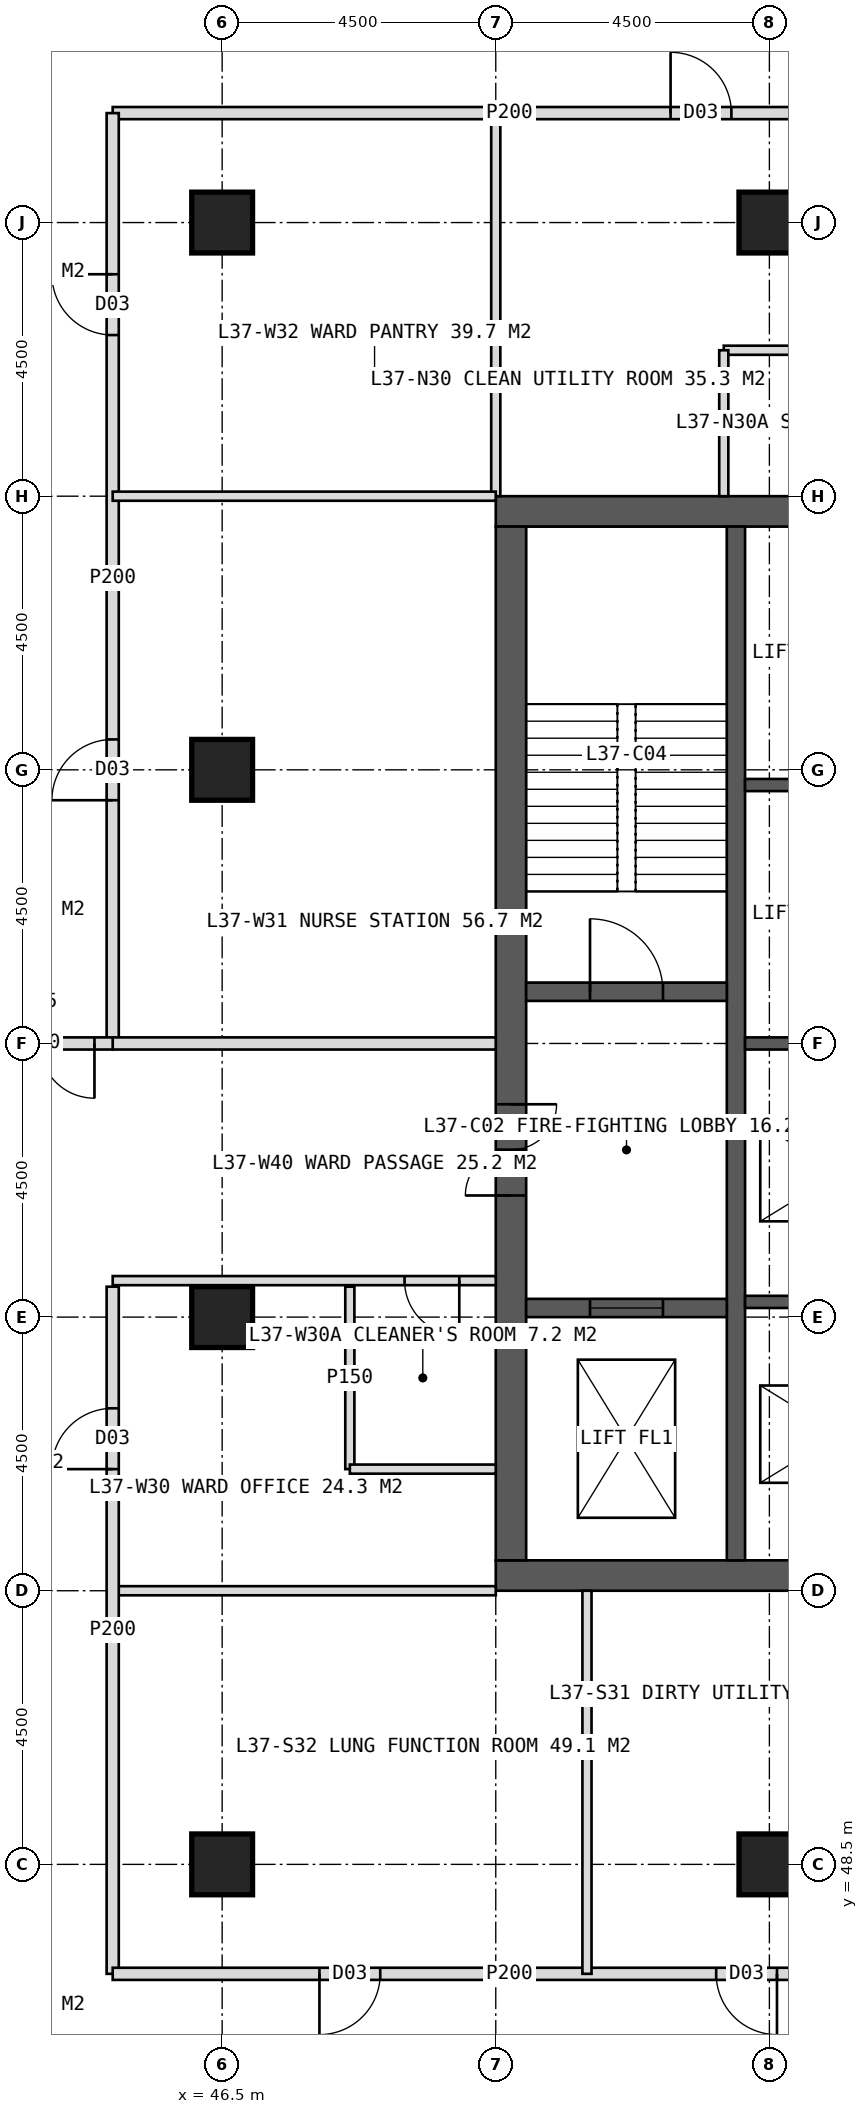
"""IFC4 building model, lengths in metres.
Left out: names, types, materials, properties, quantities, classifications, styles, units other than length and angle.
Written with IfcOpenShell. Run it as: python <this file> out.ifc"""

import sys

from ifc_helpers import new_model, si_unit, direction, frame, frame_2d, origin, origin_2d, place, context, subcontext, project, spatial, rectangle, hollow_rectangle, extrude, element, fill, save


model = new_model("IFC4")
c1 = context("Model", 3, precision=1e-05, world=origin(), true_north=direction((0.0, 1.0)))
c2 = subcontext(c1, "Body", "Model", "MODEL_VIEW")
j1 = project(units=[si_unit("LENGTHUNIT", "METRE"), si_unit("PLANEANGLEUNIT", "RADIAN")], contexts=[c1])
p1 = place(None, origin())
s1 = spatial("IfcSite", under=j1, at=p1, CompositionType="ELEMENT")
p2 = place(p1, origin())
s2 = spatial("IfcBuilding", under=s1, at=p2, CompositionType="ELEMENT")
p3 = place(p2, frame((0.0, 0.0, 156.0)))
s3 = spatial("IfcBuildingStorey", under=s2, at=p3, CompositionType="ELEMENT", Elevation=156.0)
p4 = place(p3, frame((51.0, 70.75, 0.0), z_axis=(0.0, 0.0, 1.0), x_axis=(1.0, 0.0, 0.0)))
e1 = element("IfcWall", 1, at=p4, inside=s3, PredefinedType="SHEAR", context=c2, shape_type="SweptSolid", body=[
    extrude(rectangle(XDim=18.0, YDim=0.5, at=frame_2d((9.0, 0.0))), origin(), (0.0, 0.0, 1.0), 4.0),
])
p5 = place(p4, frame((8.1, 0.0, 0.0)))
e2 = element("IfcOpeningElement", 2, at=p5, cuts=e1, PredefinedType="OPENING", context=c2, shape_type="SweptSolid", body=[
    extrude(rectangle(XDim=1.8, YDim=2.2, at=frame_2d((0.9, 1.1))), frame((0.0, 0.26, 0.0), z_axis=(0.0, -1.0, 0.0), x_axis=(1.0, 0.0, 0.0)), (0.0, 0.0, 1.0), 0.52),
])
p6 = place(p3, frame((51.0, 53.25, 0.0), z_axis=(0.0, 0.0, 1.0), x_axis=(1.0, 0.0, 0.0)))
e3 = element("IfcWall", 3, at=p6, inside=s3, PredefinedType="SHEAR", context=c2, shape_type="SweptSolid", body=[
    extrude(rectangle(XDim=18.0, YDim=0.5, at=frame_2d((9.0, 0.0))), origin(), (0.0, 0.0, 1.0), 4.0),
])
p7 = place(p6, frame((8.1, 0.0, 0.0)))
e4 = element("IfcOpeningElement", 4, at=p7, cuts=e3, PredefinedType="OPENING", context=c2, shape_type="SweptSolid", body=[
    extrude(rectangle(XDim=1.8, YDim=2.2, at=frame_2d((0.9, 1.1))), frame((0.0, 0.26, 0.0), z_axis=(0.0, -1.0, 0.0), x_axis=(1.0, 0.0, 0.0)), (0.0, 0.0, 1.0), 0.52),
])
p8 = place(p3, frame((51.25, 53.5, 0.0), z_axis=(0.0, 0.0, 1.0), x_axis=(0.0, 1.0, 0.0)))
e5 = element("IfcWall", 5, at=p8, inside=s3, PredefinedType="SHEAR", context=c2, shape_type="SweptSolid", body=[
    extrude(rectangle(XDim=17.0, YDim=0.5, at=frame_2d((8.5, 0.0))), origin(), (0.0, 0.0, 1.0), 4.0),
])
p9 = place(p8, frame((6.0, 0.0, 0.0)))
e6 = element("IfcOpeningElement", 6, at=p9, cuts=e5, PredefinedType="OPENING", context=c2, shape_type="SweptSolid", body=[
    extrude(rectangle(XDim=1.5, YDim=2.2, at=frame_2d((0.75, 1.1))), frame((0.0, 0.26, 0.0), z_axis=(0.0, -1.0, 0.0), x_axis=(1.0, 0.0, 0.0)), (0.0, 0.0, 1.0), 0.52),
])
p10 = place(p3, frame((54.95, 53.5, 0.0), z_axis=(0.0, 0.0, 1.0), x_axis=(0.0, 1.0, 0.0)))
e7 = element("IfcWall", 7, at=p10, inside=s3, PredefinedType="SHEAR", context=c2, shape_type="SweptSolid", body=[
    extrude(rectangle(XDim=17.0, YDim=0.3, at=frame_2d((8.5, 0.0))), origin(), (0.0, 0.0, 1.0), 4.0),
])
for number, where, z_axis, x_axis in (
    (8, (55.1, 57.75, 0.0), (0.0, 0.0, 1.0), (1.0, 0.0, 0.0)),
    (9, (55.1, 62.0, 0.0), (0.0, 0.0, 1.0), (1.0, 0.0, 0.0)),
    (10, (55.1, 66.25, 0.0), (0.0, 0.0, 1.0), (1.0, 0.0, 0.0)),
):
    element("IfcWall", number, at=place(p3, frame(where, z_axis=z_axis, x_axis=x_axis)), inside=s3, PredefinedType="SHEAR", context=c2, shape_type="SweptSolid", body=[
        extrude(rectangle(XDim=3.05, YDim=0.2, at=frame_2d((1.525, 0.0))), origin(), (0.0, 0.0, 1.0), 4.0),
    ])
p11 = place(p3, frame((51.5, 62.85, 0.0), z_axis=(0.0, 0.0, 1.0), x_axis=(1.0, 0.0, 0.0)))
e11 = element("IfcWall", 11, at=p11, inside=s3, PredefinedType="SHEAR", context=c2, shape_type="SweptSolid", body=[
    extrude(rectangle(XDim=3.3, YDim=0.3, at=frame_2d((1.65, 0.0))), origin(), (0.0, 0.0, 1.0), 4.0),
])
p12 = place(p11, frame((1.05, 0.0, 0.0)))
e12 = element("IfcOpeningElement", 12, at=p12, cuts=e11, PredefinedType="OPENING", context=c2, shape_type="SweptSolid", body=[
    extrude(rectangle(XDim=1.2, YDim=2.1, at=frame_2d((0.6, 1.05))), frame((0.0, 0.16, 0.0), z_axis=(0.0, -1.0, 0.0), x_axis=(1.0, 0.0, 0.0)), (0.0, 0.0, 1.0), 0.32),
])
p13 = place(p3, frame((51.5, 57.65, 0.0), z_axis=(0.0, 0.0, 1.0), x_axis=(1.0, 0.0, 0.0)))
e13 = element("IfcWall", 13, at=p13, inside=s3, PredefinedType="SHEAR", context=c2, shape_type="SweptSolid", body=[
    extrude(rectangle(XDim=3.3, YDim=0.3, at=frame_2d((1.65, 0.0))), origin(), (0.0, 0.0, 1.0), 4.0),
])
p14 = place(p13, frame((1.05, 0.0, 0.0)))
e14 = element("IfcOpeningElement", 14, at=p14, cuts=e13, PredefinedType="OPENING", context=c2, shape_type="SweptSolid", body=[
    extrude(rectangle(XDim=1.2, YDim=2.2, at=frame_2d((0.6, 1.1))), frame((0.0, 0.16, 0.0), z_axis=(0.0, -1.0, 0.0), x_axis=(1.0, 0.0, 0.0)), (0.0, 0.0, 1.0), 0.32),
])
for number, where, z_axis, x_axis in (
    (15, (46.5, 48.5, 0.0), (0.0, 0.0, 1.0), (1.0, 0.0, 0.0)),
    (16, (46.5, 75.5, 0.0), (0.0, 0.0, 1.0), (1.0, 0.0, 0.0)),
    (17, (55.5, 48.5, 0.0), (0.0, 0.0, 1.0), (1.0, 0.0, 0.0)),
    (18, (55.5, 75.5, 0.0), (0.0, 0.0, 1.0), (1.0, 0.0, 0.0)),
    (19, (46.5, 57.5, 0.0), (0.0, 0.0, 1.0), (1.0, 0.0, 0.0)),
    (20, (46.5, 66.5, 0.0), (0.0, 0.0, 1.0), (1.0, 0.0, 0.0)),
):
    element("IfcColumn", number, at=place(p3, frame(where, z_axis=z_axis, x_axis=x_axis)), inside=s3, PredefinedType="COLUMN", context=c2, shape_type="SweptSolid", body=[
        extrude(hollow_rectangle(XDim=1.0, YDim=1.0, WallThickness=0.1, at=origin_2d()), origin(), (0.0, 0.0, 1.0), 4.0),
    ])
p15 = place(p3, frame((51.0, 71.0, 0.0), z_axis=(0.0, 0.0, 1.0), x_axis=(0.0, 1.0, 0.0)))
e21 = element("IfcWall", 21, at=p15, inside=s3, PredefinedType="PARTITIONING", context=c2, shape_type="SweptSolid", body=[
    extrude(rectangle(XDim=6.3, YDim=0.15, at=frame_2d((3.15, 0.0))), origin(), (0.0, 0.0, 1.0), 3.75),
])
p16 = place(p3, frame((44.7, 77.3, 0.0), z_axis=(0.0, 0.0, 1.0), x_axis=(1.0, 0.0, 0.0)))
e22 = element("IfcWall", 22, at=p16, inside=s3, PredefinedType="PARTITIONING", context=c2, shape_type="SweptSolid", body=[
    extrude(rectangle(XDim=13.05, YDim=0.2, at=frame_2d((6.525, 0.0))), origin(), (0.0, 0.0, 1.0), 3.75),
])
p17 = place(p16, frame((9.175, 0.0, 0.0)))
e23 = element("IfcOpeningElement", 23, at=p17, cuts=e22, PredefinedType="OPENING", context=c2, shape_type="SweptSolid", body=[
    extrude(rectangle(XDim=1.0, YDim=2.1, at=frame_2d((0.5, 1.05))), frame((0.0, 0.11, 0.0), z_axis=(0.0, -1.0, 0.0), x_axis=(1.0, 0.0, 0.0)), (0.0, 0.0, 1.0), 0.22),
])
p18 = place(p3, frame((54.75, 73.4, 0.0), z_axis=(0.0, 0.0, 1.0), x_axis=(1.0, 0.0, 0.0)))
e24 = element("IfcWall", 24, at=p18, inside=s3, PredefinedType="PARTITIONING", context=c2, shape_type="SweptSolid", body=[
    extrude(rectangle(XDim=3.0, YDim=0.15, at=frame_2d((1.5, 0.0))), origin(), (0.0, 0.0, 1.0), 3.75),
])
p19 = place(p3, frame((54.75, 71.0, 0.0), z_axis=(0.0, 0.0, 1.0), x_axis=(0.0, 1.0, 0.0)))
e25 = element("IfcWall", 25, at=p19, inside=s3, PredefinedType="PARTITIONING", context=c2, shape_type="SweptSolid", body=[
    extrude(rectangle(XDim=2.4, YDim=0.15, at=frame_2d((1.2, 0.0))), origin(), (0.0, 0.0, 1.0), 3.75),
])
p20 = place(p3, frame((51.0, 53.0, 0.0), z_axis=(0.0, 0.0, 1.0), x_axis=(-1.0, 0.0, 0.0)))
e26 = element("IfcWall", 26, at=p20, inside=s3, PredefinedType="PARTITIONING", context=c2, shape_type="SweptSolid", body=[
    extrude(rectangle(XDim=6.3, YDim=0.15, at=frame_2d((3.15, 0.0))), origin(), (0.0, 0.0, 1.0), 3.75),
])
p21 = place(p3, frame((44.7, 46.7, 0.0), z_axis=(0.0, 0.0, 1.0), x_axis=(0.0, 1.0, 0.0)))
e27 = element("IfcWall", 27, at=p21, inside=s3, PredefinedType="PARTITIONING", context=c2, shape_type="SweptSolid", body=[
    extrude(rectangle(XDim=11.3, YDim=0.2, at=frame_2d((5.65, 0.0))), origin(), (0.0, 0.0, 1.0), 3.75),
])
p22 = place(p21, frame((8.3, 0.0, 0.0)))
e28 = element("IfcOpeningElement", 28, at=p22, cuts=e27, PredefinedType="OPENING", context=c2, shape_type="SweptSolid", body=[
    extrude(rectangle(XDim=1.0, YDim=2.1, at=frame_2d((0.5, 1.05))), frame((0.0, 0.11, 0.0), z_axis=(0.0, -1.0, 0.0), x_axis=(1.0, 0.0, 0.0)), (0.0, 0.0, 1.0), 0.22),
])
p23 = place(p3, frame((44.7, 62.0, 0.0), z_axis=(0.0, 0.0, 1.0), x_axis=(0.0, 1.0, 0.0)))
e29 = element("IfcWall", 29, at=p23, inside=s3, PredefinedType="PARTITIONING", context=c2, shape_type="SweptSolid", body=[
    extrude(rectangle(XDim=15.3, YDim=0.2, at=frame_2d((7.65, 0.0))), origin(), (0.0, 0.0, 1.0), 3.75),
])
p24 = place(p23, frame((4.0, 0.0, 0.0)))
e30 = element("IfcOpeningElement", 30, at=p24, cuts=e29, PredefinedType="OPENING", context=c2, shape_type="SweptSolid", body=[
    extrude(rectangle(XDim=1.0, YDim=2.1, at=frame_2d((0.5, 1.05))), frame((0.0, 0.11, 0.0), z_axis=(0.0, -1.0, 0.0), x_axis=(1.0, 0.0, 0.0)), (0.0, 0.0, 1.0), 0.22),
])
p25 = place(p23, frame((11.65, 0.0, 0.0)))
e31 = element("IfcOpeningElement", 31, at=p25, cuts=e29, PredefinedType="OPENING", context=c2, shape_type="SweptSolid", body=[
    extrude(rectangle(XDim=1.0, YDim=2.1, at=frame_2d((0.5, 1.05))), frame((0.0, 0.11, 0.0), z_axis=(0.0, -1.0, 0.0), x_axis=(1.0, 0.0, 0.0)), (0.0, 0.0, 1.0), 0.22),
])
p26 = place(p3, frame((51.0, 58.1, 0.0), z_axis=(0.0, 0.0, 1.0), x_axis=(-1.0, 0.0, 0.0)))
e32 = element("IfcWall", 32, at=p26, inside=s3, PredefinedType="PARTITIONING", context=c2, shape_type="SweptSolid", body=[
    extrude(rectangle(XDim=6.3, YDim=0.15, at=frame_2d((3.15, 0.0))), origin(), (0.0, 0.0, 1.0), 3.75),
])
p27 = place(p26, frame((0.6, 0.0, 0.0)))
e33 = element("IfcOpeningElement", 33, at=p27, cuts=e32, PredefinedType="OPENING", context=c2, shape_type="SweptSolid", body=[
    extrude(rectangle(XDim=0.9, YDim=2.1, at=frame_2d((0.45, 1.05))), frame((0.0, 0.085, 0.0), z_axis=(0.0, -1.0, 0.0), x_axis=(1.0, 0.0, 0.0)), (0.0, 0.0, 1.0), 0.17),
])
p28 = place(p3, frame((51.0, 62.0, 0.0), z_axis=(0.0, 0.0, 1.0), x_axis=(-1.0, 0.0, 0.0)))
e34 = element("IfcWall", 34, at=p28, inside=s3, PredefinedType="SOLIDWALL", context=c2, shape_type="SweptSolid", body=[
    extrude(rectangle(XDim=6.3, YDim=0.2, at=frame_2d((3.15, 0.0))), origin(), (0.0, 0.0, 1.0), 2.95),
])
p29 = place(p3, frame((51.0, 71.0, 0.0), z_axis=(0.0, 0.0, 1.0), x_axis=(-1.0, 0.0, 0.0)))
e35 = element("IfcWall", 35, at=p29, inside=s3, PredefinedType="PARTITIONING", context=c2, shape_type="SweptSolid", body=[
    extrude(rectangle(XDim=6.3, YDim=0.15, at=frame_2d((3.15, 0.0))), origin(), (0.0, 0.0, 1.0), 3.75),
])
p30 = place(p3, frame((48.6, 55.0, 0.0), z_axis=(0.0, 0.0, 1.0), x_axis=(0.0, 1.0, 0.0)))
e36 = element("IfcWall", 36, at=p30, inside=s3, PredefinedType="PARTITIONING", context=c2, shape_type="SweptSolid", body=[
    extrude(rectangle(XDim=3.0, YDim=0.15, at=frame_2d((1.5, 0.0))), origin(), (0.0, 0.0, 1.0), 3.75),
])
p31 = place(p3, frame((51.0, 55.0, 0.0), z_axis=(0.0, 0.0, 1.0), x_axis=(-1.0, 0.0, 0.0)))
e37 = element("IfcWall", 37, at=p31, inside=s3, PredefinedType="PARTITIONING", context=c2, shape_type="SweptSolid", body=[
    extrude(rectangle(XDim=2.4, YDim=0.15, at=frame_2d((1.2, 0.0))), origin(), (0.0, 0.0, 1.0), 3.75),
])
p32 = place(p3, frame((57.75, 46.7, 0.0), z_axis=(0.0, 0.0, 1.0), x_axis=(-1.0, 0.0, 0.0)))
e38 = element("IfcWall", 38, at=p32, inside=s3, PredefinedType="PARTITIONING", context=c2, shape_type="SweptSolid", body=[
    extrude(rectangle(XDim=13.05, YDim=0.2, at=frame_2d((6.525, 0.0))), origin(), (0.0, 0.0, 1.0), 3.75),
])
p33 = place(p32, frame((2.125, 0.0, 0.0)))
e39 = element("IfcOpeningElement", 39, at=p33, cuts=e38, PredefinedType="OPENING", context=c2, shape_type="SweptSolid", body=[
    extrude(rectangle(XDim=1.0, YDim=2.1, at=frame_2d((0.5, 1.05))), frame((0.0, 0.11, 0.0), z_axis=(0.0, -1.0, 0.0), x_axis=(1.0, 0.0, 0.0)), (0.0, 0.0, 1.0), 0.22),
])
p34 = place(p32, frame((8.65, 0.0, 0.0)))
e40 = element("IfcOpeningElement", 40, at=p34, cuts=e38, PredefinedType="OPENING", context=c2, shape_type="SweptSolid", body=[
    extrude(rectangle(XDim=1.0, YDim=2.1, at=frame_2d((0.5, 1.05))), frame((0.0, 0.11, 0.0), z_axis=(0.0, -1.0, 0.0), x_axis=(1.0, 0.0, 0.0)), (0.0, 0.0, 1.0), 0.22),
])
p35 = place(p3, frame((52.5, 53.0, 0.0), z_axis=(0.0, 0.0, 1.0), x_axis=(0.0, -1.0, 0.0)))
e41 = element("IfcWall", 41, at=p35, inside=s3, PredefinedType="PARTITIONING", context=c2, shape_type="SweptSolid", body=[
    extrude(rectangle(XDim=6.3, YDim=0.15, at=frame_2d((3.15, 0.0))), origin(), (0.0, 0.0, 1.0), 3.75),
])
p36 = place(p3, frame((44.7, 62.0, 0.0), z_axis=(0.0, 0.0, 1.0), x_axis=(-1.0, 0.0, 0.0)))
e42 = element("IfcWall", 42, at=p36, inside=s3, PredefinedType="SOLIDWALL", context=c2, shape_type="SweptSolid", body=[
    extrude(rectangle(XDim=2.7, YDim=0.2, at=frame_2d((1.35, 0.0))), origin(), (0.0, 0.0, 1.0), 2.95),
])
p37 = place(p36, frame((0.3, 0.0, 0.0)))
e43 = element("IfcOpeningElement", 43, at=p37, cuts=e42, PredefinedType="OPENING", context=c2, shape_type="SweptSolid", body=[
    extrude(rectangle(XDim=1.8, YDim=2.2, at=frame_2d((0.9, 1.1))), frame((0.0, 0.11, 0.0), z_axis=(0.0, -1.0, 0.0), x_axis=(1.0, 0.0, 0.0)), (0.0, 0.0, 1.0), 0.22),
])
p38 = place(p17, origin())
e44 = element("IfcDoor", 44, at=p38, inside=s3, OperationType="SINGLE_SWING_LEFT", PredefinedType="DOOR", context=c2, shape_type="SweptSolid", body=[
    extrude(rectangle(XDim=1.0, YDim=2.1, at=frame_2d((0.5, 1.05))), frame((0.0, 0.025, 0.0), z_axis=(0.0, -1.0, 0.0), x_axis=(1.0, 0.0, 0.0)), (0.0, 0.0, 1.0), 0.05),
])
fill(e23, e44)
p39 = place(p27, origin())
e45 = element("IfcDoor", 45, at=p39, inside=s3, OperationType="SINGLE_SWING_LEFT", PredefinedType="DOOR", context=c2, shape_type="SweptSolid", body=[
    extrude(rectangle(XDim=0.9, YDim=2.1, at=frame_2d((0.45, 1.05))), frame((0.0, 0.025, 0.0), z_axis=(0.0, -1.0, 0.0), x_axis=(1.0, 0.0, 0.0)), (0.0, 0.0, 1.0), 0.05),
])
fill(e33, e45)
p40 = place(p22, origin())
e46 = element("IfcDoor", 46, at=p40, inside=s3, OperationType="SINGLE_SWING_LEFT", PredefinedType="DOOR", context=c2, shape_type="SweptSolid", body=[
    extrude(rectangle(XDim=1.0, YDim=2.1, at=frame_2d((0.5, 1.05))), frame((0.0, 0.025, 0.0), z_axis=(0.0, -1.0, 0.0), x_axis=(1.0, 0.0, 0.0)), (0.0, 0.0, 1.0), 0.05),
])
fill(e28, e46)
p41 = place(p24, origin())
e47 = element("IfcDoor", 47, at=p41, inside=s3, OperationType="SINGLE_SWING_LEFT", PredefinedType="DOOR", context=c2, shape_type="SweptSolid", body=[
    extrude(rectangle(XDim=1.0, YDim=2.1, at=frame_2d((0.5, 1.05))), frame((0.0, 0.025, 0.0), z_axis=(0.0, -1.0, 0.0), x_axis=(1.0, 0.0, 0.0)), (0.0, 0.0, 1.0), 0.05),
])
fill(e30, e47)
p42 = place(p25, origin())
e48 = element("IfcDoor", 48, at=p42, inside=s3, OperationType="SINGLE_SWING_RIGHT", PredefinedType="DOOR", context=c2, shape_type="SweptSolid", body=[
    extrude(rectangle(XDim=1.0, YDim=2.1, at=frame_2d((0.5, 1.05))), frame((0.0, 0.025, 0.0), z_axis=(0.0, -1.0, 0.0), x_axis=(1.0, 0.0, 0.0)), (0.0, 0.0, 1.0), 0.05),
])
fill(e31, e48)
p43 = place(p33, origin())
e49 = element("IfcDoor", 49, at=p43, inside=s3, OperationType="SINGLE_SWING_LEFT", PredefinedType="DOOR", context=c2, shape_type="SweptSolid", body=[
    extrude(rectangle(XDim=1.0, YDim=2.1, at=frame_2d((0.5, 1.05))), frame((0.0, 0.025, 0.0), z_axis=(0.0, -1.0, 0.0), x_axis=(1.0, 0.0, 0.0)), (0.0, 0.0, 1.0), 0.05),
])
fill(e39, e49)
p44 = place(p34, origin())
e50 = element("IfcDoor", 50, at=p44, inside=s3, OperationType="SINGLE_SWING_RIGHT", PredefinedType="DOOR", context=c2, shape_type="SweptSolid", body=[
    extrude(rectangle(XDim=1.0, YDim=2.1, at=frame_2d((0.5, 1.05))), frame((0.0, 0.025, 0.0), z_axis=(0.0, -1.0, 0.0), x_axis=(1.0, 0.0, 0.0)), (0.0, 0.0, 1.0), 0.05),
])
fill(e40, e50)
p45 = place(p37, origin())
e51 = element("IfcDoor", 51, at=p45, inside=s3, OperationType="DOUBLE_DOOR_DOUBLE_SWING", PredefinedType="DOOR", context=c2, shape_type="SweptSolid", body=[
    extrude(rectangle(XDim=1.8, YDim=2.2, at=frame_2d((0.9, 1.1))), frame((0.0, 0.025, 0.0), z_axis=(0.0, -1.0, 0.0), x_axis=(1.0, 0.0, 0.0)), (0.0, 0.0, 1.0), 0.05),
])
fill(e43, e51)
p46 = place(p9, origin())
e52 = element("IfcDoor", 52, at=p46, inside=s3, OperationType="DOUBLE_DOOR_SINGLE_SWING", PredefinedType="DOOR", context=c2, shape_type="SweptSolid", body=[
    extrude(rectangle(XDim=1.5, YDim=2.2, at=frame_2d((0.75, 1.1))), frame((0.0, 0.025, 0.0), z_axis=(0.0, -1.0, 0.0), x_axis=(1.0, 0.0, 0.0)), (0.0, 0.0, 1.0), 0.05),
])
fill(e6, e52)
p47 = place(p12, origin())
e53 = element("IfcDoor", 53, at=p47, inside=s3, OperationType="SINGLE_SWING_LEFT", PredefinedType="DOOR", context=c2, shape_type="SweptSolid", body=[
    extrude(rectangle(XDim=1.2, YDim=2.1, at=frame_2d((0.6, 1.05))), frame((0.0, 0.025, 0.0), z_axis=(0.0, -1.0, 0.0), x_axis=(1.0, 0.0, 0.0)), (0.0, 0.0, 1.0), 0.05),
])
fill(e12, e53)
p48 = place(p14, origin())
e54 = element("IfcDoor", 54, at=p48, inside=s3, OperationType="SLIDING_TO_LEFT", PredefinedType="DOOR", context=c2, shape_type="SweptSolid", body=[
    extrude(rectangle(XDim=1.2, YDim=2.2, at=frame_2d((0.6, 1.1))), frame((0.0, 0.025, 0.0), z_axis=(0.0, -1.0, 0.0), x_axis=(1.0, 0.0, 0.0)), (0.0, 0.0, 1.0), 0.05),
])
fill(e14, e54)
save(model, sys.argv[1])
